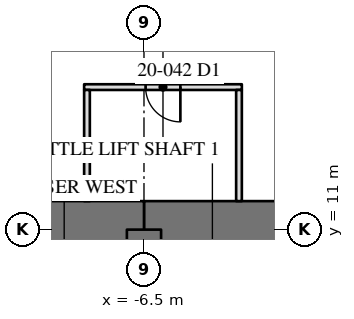
"""IFC4 building model, lengths in metres.
Left out: names, types, materials, properties, quantities, classifications, styles, units other than length and angle.
Written with IfcOpenShell. Run it as: python <this file> out.ifc"""

import sys

from ifc_helpers import new_model, si_unit, direction, frame, frame_2d, origin, place, context, subcontext, project, spatial, rectangle, extrude, element, fill, save


model = new_model("IFC4")
c1 = context("Model", 3, precision=1e-05, world=origin(), true_north=direction((0.0, 1.0)))
c2 = subcontext(c1, "Body", "Model", "MODEL_VIEW")
j1 = project(units=[si_unit("LENGTHUNIT", "METRE"), si_unit("PLANEANGLEUNIT", "RADIAN")], contexts=[c1])
p1 = place(None, origin())
s1 = spatial("IfcSite", under=j1, at=p1, CompositionType="ELEMENT")
p2 = place(p1, origin())
s2 = spatial("IfcBuilding", under=s1, at=p2, CompositionType="ELEMENT")
p3 = place(p2, frame((0.0, 0.0, 85.7)))
s3 = spatial("IfcBuildingStorey", under=s2, at=p3, CompositionType="ELEMENT", Elevation=85.7)
p4 = place(p3, frame((6.5, 11.0, 0.0), z_axis=(0.0, 0.0, 1.0), x_axis=(-1.0, 0.0, 0.0)))
e1 = element("IfcWall", 1, at=p4, inside=s3, PredefinedType="SHEAR", context=c2, shape_type="SweptSolid", body=[
    extrude(rectangle(XDim=13.0, YDim=1.5, at=frame_2d((6.5, 0.0))), origin(), (0.0, 0.0, 1.0), 4.1),
])
p5 = place(p3, frame((-6.5, 11.0, 0.0), z_axis=(0.0, 0.0, 1.0), x_axis=(-1.0, 0.0, 0.0)))
e2 = element("IfcWall", 2, at=p5, inside=s3, PredefinedType="SHEAR", context=c2, shape_type="SweptSolid", body=[
    extrude(rectangle(XDim=4.5, YDim=1.5, at=frame_2d((2.25, 0.0))), origin(), (0.0, 0.0, 1.0), 4.1),
])
p6 = place(p3, frame((-6.5, 11.0, 0.0), z_axis=(0.0, 0.0, 1.0), x_axis=(0.0, -1.0, 0.0)))
e3 = element("IfcWall", 3, at=p6, inside=s3, PredefinedType="SHEAR", context=c2, shape_type="SweptSolid", body=[
    extrude(rectangle(XDim=4.5, YDim=0.9, at=frame_2d((2.25, 0.0))), origin(), (0.0, 0.0, 1.0), 4.1),
])
p7 = place(p3, frame((-3.925, 14.75, 0.0), z_axis=(0.0, 0.0, 1.0), x_axis=(-1.0, 0.0, 0.0)))
e4 = element("IfcWall", 4, at=p7, inside=s3, PredefinedType="PARTITIONING", context=c2, shape_type="SweptSolid", body=[
    extrude(rectangle(XDim=4.15, YDim=0.15, at=frame_2d((2.075, 0.0))), origin(), (0.0, 0.0, 1.0), 3.91),
])
p8 = place(p7, frame((1.617, 0.0, 0.0)))
e5 = element("IfcOpeningElement", 5, at=p8, cuts=e4, PredefinedType="OPENING", context=c2, shape_type="SweptSolid", body=[
    extrude(rectangle(XDim=0.915, YDim=2.134, at=frame_2d((0.458, 1.067))), frame((0.0, 0.085, 0.0), z_axis=(0.0, -1.0, 0.0), x_axis=(1.0, 0.0, 0.0)), (0.0, 0.0, 1.0), 0.17),
])
for number, where, z_axis, x_axis in (
    (6, (-4.0, 14.675, 0.0), (0.0, 0.0, 1.0), (0.0, -1.0, 0.0)),
    (7, (-8.0, 14.675, 0.0), (0.0, 0.0, 1.0), (0.0, -1.0, 0.0)),
):
    element("IfcWall", number, at=place(p3, frame(where, z_axis=z_axis, x_axis=x_axis)), inside=s3, PredefinedType="PARTITIONING", context=c2, shape_type="SweptSolid", body=[
        extrude(rectangle(XDim=2.925, YDim=0.15, at=frame_2d((1.462, 0.0))), origin(), (0.0, 0.0, 1.0), 3.91),
    ])
p9 = place(p8, origin())
e8 = element("IfcDoor", 8, at=p9, inside=s3, OperationType="SINGLE_SWING_LEFT", PredefinedType="DOOR", context=c2, shape_type="SweptSolid", body=[
    extrude(rectangle(XDim=0.915, YDim=2.134, at=frame_2d((0.458, 1.067))), frame((0.0, 0.025, 0.0), z_axis=(0.0, -1.0, 0.0), x_axis=(1.0, 0.0, 0.0)), (0.0, 0.0, 1.0), 0.05),
])
fill(e5, e8)
save(model, sys.argv[1])
